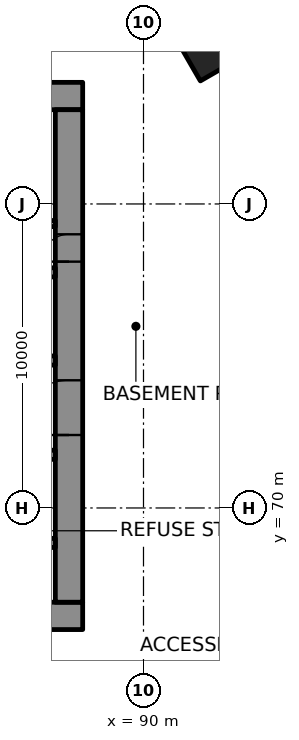
"""IFC4 building model, lengths in metres.
Left out: names, types, materials, properties, quantities, classifications, styles, units other than length and angle.
Written with IfcOpenShell. Run it as: python <this file> out.ifc"""

import sys

from ifc_helpers import new_model, si_unit, direction, frame, frame_2d, origin, origin_2d, place, context, subcontext, project, spatial, rectangle, extrude, element, fill, save


model = new_model("IFC4")
c1 = context("Model", 3, precision=1e-05, world=origin(), true_north=direction((0.0, 1.0)))
c2 = subcontext(c1, "Body", "Model", "MODEL_VIEW")
j1 = project(units=[si_unit("LENGTHUNIT", "METRE"), si_unit("PLANEANGLEUNIT", "RADIAN")], contexts=[c1])
p1 = place(None, origin())
s1 = spatial("IfcSite", under=j1, at=p1, CompositionType="ELEMENT")
p2 = place(p1, origin())
s2 = spatial("IfcBuilding", under=s1, at=p2, CompositionType="ELEMENT")
p3 = place(p2, frame((0.0, 0.0, -5.0)))
s3 = spatial("IfcBuildingStorey", under=s2, at=p3, CompositionType="ELEMENT", Elevation=-5.0)
p4 = place(p3, frame((109.132, 57.451, -0.35), z_axis=(0.0, 0.0, 1.0), x_axis=(-0.499999206999, 0.866025861623, 0.0)))
e1 = element("IfcWall", 1, at=p4, inside=s3, PredefinedType="SOLIDWALL", context=c2, shape_type="SweptSolid", body=[
    extrude(rectangle(XDim=61.064, YDim=0.6, at=frame_2d((30.532, 0.0))), origin(), (0.0, 0.0, 1.0), 5.05),
])
p5 = place(p3, frame((92.22, 84.942, 0.0), z_axis=(0.0, 0.0, 1.0), x_axis=(-0.5, 0.866025403784, 0.0)))
e2 = element("IfcColumn", 2, at=p5, inside=s3, PredefinedType="COLUMN", context=c2, shape_type="SweptSolid", body=[
    extrude(rectangle(XDim=1.2, YDim=1.5, at=origin_2d()), origin(), (0.0, 0.0, 1.0), 5.0),
])
p6 = place(p3, frame((62.0, 66.45, 0.0), z_axis=(0.0, 0.0, 1.0), x_axis=(1.0, 0.0, 0.0)))
e3 = element("IfcWall", 3, at=p6, inside=s3, PredefinedType="SHEAR", context=c2, shape_type="SweptSolid", body=[
    extrude(rectangle(XDim=26.0, YDim=0.9, at=frame_2d((13.0, 0.0))), origin(), (0.0, 0.0, 1.0), 4.7),
])
p7 = place(p6, frame((3.45, 0.0, 0.0)))
e4 = element("IfcOpeningElement", 4, at=p7, cuts=e3, PredefinedType="OPENING", context=c2, shape_type="SweptSolid", body=[
    extrude(rectangle(XDim=0.9, YDim=2.1, at=frame_2d((0.45, 1.05))), frame((0.0, 0.46, 0.0), z_axis=(0.0, -1.0, 0.0), x_axis=(1.0, 0.0, 0.0)), (0.0, 0.0, 1.0), 0.92),
])
p8 = place(p6, frame((5.637, 0.0, 0.0)))
e5 = element("IfcOpeningElement", 5, at=p8, cuts=e3, PredefinedType="OPENING", context=c2, shape_type="SweptSolid", body=[
    extrude(rectangle(XDim=0.9, YDim=2.1, at=frame_2d((0.45, 1.05))), frame((0.0, 0.46, 0.0), z_axis=(0.0, -1.0, 0.0), x_axis=(1.0, 0.0, 0.0)), (0.0, 0.0, 1.0), 0.92),
])
p9 = place(p6, frame((7.212, 0.0, 0.0)))
e6 = element("IfcOpeningElement", 6, at=p9, cuts=e3, PredefinedType="OPENING", context=c2, shape_type="SweptSolid", body=[
    extrude(rectangle(XDim=0.9, YDim=2.1, at=frame_2d((0.45, 1.05))), frame((0.0, 0.46, 0.0), z_axis=(0.0, -1.0, 0.0), x_axis=(1.0, 0.0, 0.0)), (0.0, 0.0, 1.0), 0.92),
])
p10 = place(p6, frame((8.999, 0.0, 0.0)))
e7 = element("IfcOpeningElement", 7, at=p10, cuts=e3, PredefinedType="OPENING", context=c2, shape_type="SweptSolid", body=[
    extrude(rectangle(XDim=0.9, YDim=2.1, at=frame_2d((0.45, 1.05))), frame((0.0, 0.46, 0.0), z_axis=(0.0, -1.0, 0.0), x_axis=(1.0, 0.0, 0.0)), (0.0, 0.0, 1.0), 0.92),
])
p11 = place(p6, frame((17.324, 0.0, 0.0)))
e8 = element("IfcOpeningElement", 8, at=p11, cuts=e3, PredefinedType="OPENING", context=c2, shape_type="SweptSolid", body=[
    extrude(rectangle(XDim=0.9, YDim=2.1, at=frame_2d((0.45, 1.05))), frame((0.0, 0.46, 0.0), z_axis=(0.0, -1.0, 0.0), x_axis=(1.0, 0.0, 0.0)), (0.0, 0.0, 1.0), 0.92),
])
p12 = place(p3, frame((62.0, 83.55, 0.0), z_axis=(0.0, 0.0, 1.0), x_axis=(1.0, 0.0, 0.0)))
e9 = element("IfcWall", 9, at=p12, inside=s3, PredefinedType="SHEAR", context=c2, shape_type="SweptSolid", body=[
    extrude(rectangle(XDim=26.0, YDim=0.9, at=frame_2d((13.0, 0.0))), origin(), (0.0, 0.0, 1.0), 4.7),
])
p13 = place(p12, frame((5.695, 0.0, 0.0)))
e10 = element("IfcOpeningElement", 10, at=p13, cuts=e9, PredefinedType="OPENING", context=c2, shape_type="SweptSolid", body=[
    extrude(rectangle(XDim=1.0, YDim=2.1, at=frame_2d((0.5, 1.05))), frame((0.0, 0.46, 0.0), z_axis=(0.0, -1.0, 0.0), x_axis=(1.0, 0.0, 0.0)), (0.0, 0.0, 1.0), 0.92),
])
p14 = place(p12, frame((19.505, 0.0, 0.0)))
e11 = element("IfcOpeningElement", 11, at=p14, cuts=e9, PredefinedType="OPENING", context=c2, shape_type="SweptSolid", body=[
    extrude(rectangle(XDim=1.0, YDim=2.1, at=frame_2d((0.5, 1.05))), frame((0.0, 0.46, 0.0), z_axis=(0.0, -1.0, 0.0), x_axis=(1.0, 0.0, 0.0)), (0.0, 0.0, 1.0), 0.92),
])
p15 = place(p12, frame((3.45, 0.0, 0.0)))
e12 = element("IfcOpeningElement", 12, at=p15, cuts=e9, PredefinedType="OPENING", context=c2, shape_type="SweptSolid", body=[
    extrude(rectangle(XDim=0.9, YDim=2.1, at=frame_2d((0.45, 1.05))), frame((0.0, 0.46, 0.0), z_axis=(0.0, -1.0, 0.0), x_axis=(1.0, 0.0, 0.0)), (0.0, 0.0, 1.0), 0.92),
])
p16 = place(p12, frame((12.65, 0.0, 0.0)))
e13 = element("IfcOpeningElement", 13, at=p16, cuts=e9, PredefinedType="OPENING", context=c2, shape_type="SweptSolid", body=[
    extrude(rectangle(XDim=0.9, YDim=2.1, at=frame_2d((0.45, 1.05))), frame((0.0, 0.46, 0.0), z_axis=(0.0, -1.0, 0.0), x_axis=(1.0, 0.0, 0.0)), (0.0, 0.0, 1.0), 0.92),
])
p17 = place(p12, frame((22.55, 0.0, 0.0)))
e14 = element("IfcOpeningElement", 14, at=p17, cuts=e9, PredefinedType="OPENING", context=c2, shape_type="SweptSolid", body=[
    extrude(rectangle(XDim=0.9, YDim=2.1, at=frame_2d((0.45, 1.05))), frame((0.0, 0.46, 0.0), z_axis=(0.0, -1.0, 0.0), x_axis=(1.0, 0.0, 0.0)), (0.0, 0.0, 1.0), 0.92),
])
p18 = place(p3, frame((87.55, 66.9, 0.0), z_axis=(0.0, 0.0, 1.0), x_axis=(0.0, 1.0, 0.0)))
e15 = element("IfcWall", 15, at=p18, inside=s3, PredefinedType="SHEAR", context=c2, shape_type="SweptSolid", body=[
    extrude(rectangle(XDim=16.2, YDim=0.9, at=frame_2d((8.1, 0.0))), origin(), (0.0, 0.0, 1.0), 4.7),
])
p19 = place(p18, frame((5.5, 0.0, 0.0)))
e16 = element("IfcOpeningElement", 16, at=p19, cuts=e15, PredefinedType="OPENING", context=c2, shape_type="SweptSolid", body=[
    extrude(rectangle(XDim=1.8, YDim=2.1, at=frame_2d((0.9, 1.05))), frame((0.0, 0.46, 0.0), z_axis=(0.0, -1.0, 0.0), x_axis=(1.0, 0.0, 0.0)), (0.0, 0.0, 1.0), 0.92),
])
p20 = place(p18, frame((11.202, 0.0, 0.0)))
e17 = element("IfcOpeningElement", 17, at=p20, cuts=e15, PredefinedType="OPENING", context=c2, shape_type="SweptSolid", body=[
    extrude(rectangle(XDim=0.9, YDim=2.1, at=frame_2d((0.45, 1.05))), frame((0.0, 0.46, 0.0), z_axis=(0.0, -1.0, 0.0), x_axis=(1.0, 0.0, 0.0)), (0.0, 0.0, 1.0), 0.92),
])
p21 = place(p3, frame((70.35, 68.85, 0.0), z_axis=(0.0, 0.0, 1.0), x_axis=(1.0, 0.0, 0.0)))
e18 = element("IfcWall", 18, at=p21, inside=s3, PredefinedType="SHEAR", context=c2, shape_type="SweptSolid", body=[
    extrude(rectangle(XDim=16.75, YDim=0.3, at=frame_2d((8.375, 0.0))), origin(), (0.0, 0.0, 1.0), 4.7),
])
p22 = place(p3, frame((70.3, 71.75, 0.0), z_axis=(0.0, 0.0, 1.0), x_axis=(1.0, 0.0, 0.0)))
e19 = element("IfcWall", 19, at=p22, inside=s3, PredefinedType="SHEAR", context=c2, shape_type="SweptSolid", body=[
    extrude(rectangle(XDim=16.8, YDim=0.3, at=frame_2d((8.4, 0.0))), origin(), (0.0, 0.0, 1.0), 4.7),
])
p23 = place(p22, frame((1.0, 0.0, 0.0)))
e20 = element("IfcOpeningElement", 20, at=p23, cuts=e19, PredefinedType="OPENING", context=c2, shape_type="SweptSolid", body=[
    extrude(rectangle(XDim=1.1, YDim=2.1, at=frame_2d((0.55, 1.05))), frame((0.0, 0.16, 0.0), z_axis=(0.0, -1.0, 0.0), x_axis=(1.0, 0.0, 0.0)), (0.0, 0.0, 1.0), 0.32),
])
p24 = place(p22, frame((3.8, 0.0, 0.0)))
e21 = element("IfcOpeningElement", 21, at=p24, cuts=e19, PredefinedType="OPENING", context=c2, shape_type="SweptSolid", body=[
    extrude(rectangle(XDim=1.1, YDim=2.1, at=frame_2d((0.55, 1.05))), frame((0.0, 0.16, 0.0), z_axis=(0.0, -1.0, 0.0), x_axis=(1.0, 0.0, 0.0)), (0.0, 0.0, 1.0), 0.32),
])
p25 = place(p22, frame((6.6, 0.0, 0.0)))
e22 = element("IfcOpeningElement", 22, at=p25, cuts=e19, PredefinedType="OPENING", context=c2, shape_type="SweptSolid", body=[
    extrude(rectangle(XDim=1.1, YDim=2.1, at=frame_2d((0.55, 1.05))), frame((0.0, 0.16, 0.0), z_axis=(0.0, -1.0, 0.0), x_axis=(1.0, 0.0, 0.0)), (0.0, 0.0, 1.0), 0.32),
])
p26 = place(p22, frame((9.4, 0.0, 0.0)))
e23 = element("IfcOpeningElement", 23, at=p26, cuts=e19, PredefinedType="OPENING", context=c2, shape_type="SweptSolid", body=[
    extrude(rectangle(XDim=1.1, YDim=2.1, at=frame_2d((0.55, 1.05))), frame((0.0, 0.16, 0.0), z_axis=(0.0, -1.0, 0.0), x_axis=(1.0, 0.0, 0.0)), (0.0, 0.0, 1.0), 0.32),
])
p27 = place(p22, frame((12.2, 0.0, 0.0)))
e24 = element("IfcOpeningElement", 24, at=p27, cuts=e19, PredefinedType="OPENING", context=c2, shape_type="SweptSolid", body=[
    extrude(rectangle(XDim=1.1, YDim=2.1, at=frame_2d((0.55, 1.05))), frame((0.0, 0.16, 0.0), z_axis=(0.0, -1.0, 0.0), x_axis=(1.0, 0.0, 0.0)), (0.0, 0.0, 1.0), 0.32),
])
p28 = place(p22, frame((14.925, 0.0, 0.0)))
e25 = element("IfcOpeningElement", 25, at=p28, cuts=e19, PredefinedType="OPENING", context=c2, shape_type="SweptSolid", body=[
    extrude(rectangle(XDim=1.1, YDim=2.1, at=frame_2d((0.55, 1.05))), frame((0.0, 0.16, 0.0), z_axis=(0.0, -1.0, 0.0), x_axis=(1.0, 0.0, 0.0)), (0.0, 0.0, 1.0), 0.32),
])
p29 = place(p3, frame((70.3, 74.85, 0.0), z_axis=(0.0, 0.0, 1.0), x_axis=(1.0, 0.0, 0.0)))
e26 = element("IfcWall", 26, at=p29, inside=s3, PredefinedType="SHEAR", context=c2, shape_type="SweptSolid", body=[
    extrude(rectangle(XDim=16.8, YDim=0.3, at=frame_2d((8.4, 0.0))), origin(), (0.0, 0.0, 1.0), 4.7),
])
p30 = place(p29, frame((3.8, 0.0, 0.0)))
e27 = element("IfcOpeningElement", 27, at=p30, cuts=e26, PredefinedType="OPENING", context=c2, shape_type="SweptSolid", body=[
    extrude(rectangle(XDim=1.1, YDim=2.1, at=frame_2d((0.55, 1.05))), frame((0.0, 0.16, 0.0), z_axis=(0.0, -1.0, 0.0), x_axis=(1.0, 0.0, 0.0)), (0.0, 0.0, 1.0), 0.32),
])
p31 = place(p29, frame((12.2, 0.0, 0.0)))
e28 = element("IfcOpeningElement", 28, at=p31, cuts=e26, PredefinedType="OPENING", context=c2, shape_type="SweptSolid", body=[
    extrude(rectangle(XDim=1.1, YDim=2.1, at=frame_2d((0.55, 1.05))), frame((0.0, 0.16, 0.0), z_axis=(0.0, -1.0, 0.0), x_axis=(1.0, 0.0, 0.0)), (0.0, 0.0, 1.0), 0.32),
])
p32 = place(p29, frame((14.925, 0.0, 0.0)))
e29 = element("IfcOpeningElement", 29, at=p32, cuts=e26, PredefinedType="OPENING", context=c2, shape_type="SweptSolid", body=[
    extrude(rectangle(XDim=1.1, YDim=2.1, at=frame_2d((0.55, 1.05))), frame((0.0, 0.16, 0.0), z_axis=(0.0, -1.0, 0.0), x_axis=(1.0, 0.0, 0.0)), (0.0, 0.0, 1.0), 0.32),
])
p33 = place(p3, frame((64.35, 77.75, 0.0), z_axis=(0.0, 0.0, 1.0), x_axis=(1.0, 0.0, 0.0)))
e30 = element("IfcWall", 30, at=p33, inside=s3, PredefinedType="SHEAR", context=c2, shape_type="SweptSolid", body=[
    extrude(rectangle(XDim=22.75, YDim=0.3, at=frame_2d((11.375, 0.0))), origin(), (0.0, 0.0, 1.0), 4.7),
])
p34 = place(p33, frame((3.345, 0.0, 0.0)))
e31 = element("IfcOpeningElement", 31, at=p34, cuts=e30, PredefinedType="OPENING", context=c2, shape_type="SweptSolid", body=[
    extrude(rectangle(XDim=1.0, YDim=2.1, at=frame_2d((0.5, 1.05))), frame((0.0, 0.16, 0.0), z_axis=(0.0, -1.0, 0.0), x_axis=(1.0, 0.0, 0.0)), (0.0, 0.0, 1.0), 0.32),
])
p35 = place(p3, frame((83.05, 79.355, 0.0), z_axis=(0.0, 0.0, 1.0), x_axis=(1.0, 0.0, 0.0)))
e32 = element("IfcWall", 32, at=p35, inside=s3, PredefinedType="PARTITIONING", context=c2, shape_type="SweptSolid", body=[
    extrude(rectangle(XDim=4.05, YDim=0.2, at=frame_2d((2.025, 0.0))), origin(), (0.0, 0.0, 1.0), 4.7),
])
p36 = place(p19, origin())
e33 = element("IfcDoor", 33, at=p36, inside=s3, OperationType="SINGLE_SWING_RIGHT", PredefinedType="DOOR", context=c2, shape_type="SweptSolid", body=[
    extrude(rectangle(XDim=1.8, YDim=2.1, at=frame_2d((0.9, 1.05))), frame((0.0, 0.17, 0.0), z_axis=(0.0, -1.0, 0.0), x_axis=(1.0, 0.0, 0.0)), (0.0, 0.0, 1.0), 0.34),
])
fill(e16, e33)
p37 = place(p20, origin())
e34 = element("IfcDoor", 34, at=p37, inside=s3, OperationType="SINGLE_SWING_RIGHT", PredefinedType="DOOR", context=c2, shape_type="SweptSolid", body=[
    extrude(rectangle(XDim=0.9, YDim=2.1, at=frame_2d((0.45, 1.05))), frame((0.0, 0.17, 0.0), z_axis=(0.0, -1.0, 0.0), x_axis=(1.0, 0.0, 0.0)), (0.0, 0.0, 1.0), 0.34),
])
fill(e17, e34)
save(model, sys.argv[1])
